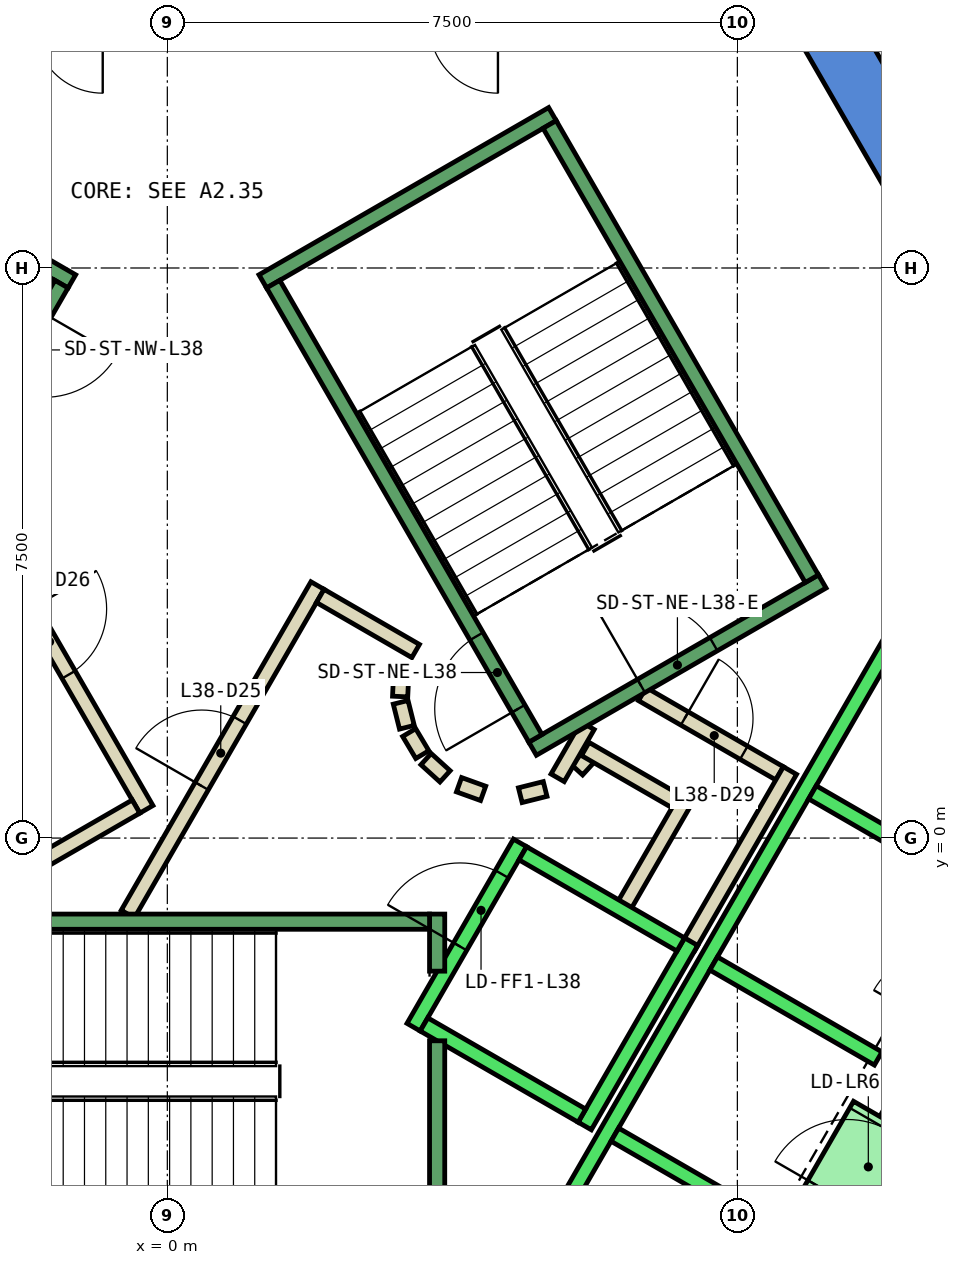
"""IFC4 building model, lengths in metres.
Left out: names, types, materials, properties, quantities, classifications, styles, units other than length and angle.
Written with IfcOpenShell. Run it as: python <this file> out.ifc"""

import sys

from ifc_helpers import new_model, si_unit, direction, frame, frame_2d, origin, place, context, subcontext, project, spatial, polyline, rectangle, outline, extrude, element, fill, save


model = new_model("IFC4")
c1 = context("Model", 3, precision=1e-05, world=origin(), true_north=direction((0.0, 1.0)))
c2 = subcontext(c1, "Body", "Model", "MODEL_VIEW")
j1 = project(units=[si_unit("LENGTHUNIT", "METRE"), si_unit("PLANEANGLEUNIT", "RADIAN")], contexts=[c1])
p1 = place(None, origin())
s1 = spatial("IfcSite", under=j1, at=p1, CompositionType="ELEMENT")
p2 = place(p1, origin())
s2 = spatial("IfcBuilding", under=s1, at=p2, CompositionType="ELEMENT")
p3 = place(p2, frame((0.0, 0.0, 171.8)))
s3 = spatial("IfcBuildingStorey", under=s2, at=p3, CompositionType="ELEMENT", Elevation=171.8)
p4 = place(p3, frame((0.0, 0.0, -0.4)))
e1 = element("IfcWall", 1, at=p4, inside=s3, PredefinedType="SHEAR", context=c2, shape_type="SweptSolid", body=[
    extrude(outline(polyline([(8.517, 11.748), (7.824, 11.348), (12.933, 2.5), (13.856, 2.5), (8.517, 11.748)])), origin(), (0.0, 0.0, 1.0), 4.2),
])
p5 = place(p3, frame((0.0, 0.0, -0.4)))
e2 = element("IfcWall", 2, at=p5, inside=s3, PredefinedType="SHEAR", context=c2, shape_type="SweptSolid", body=[
    extrude(outline(polyline([(10.717, -2.937), (10.025, -2.537), (9.374, -3.663), (10.067, -4.063), (10.717, -2.937)])), origin(), (0.0, 0.0, 1.0), 4.2),
])
p6 = place(p3, frame((0.0, 0.0, 3.6)))
e3 = element("IfcWall", 3, at=p6, inside=s3, PredefinedType="SHEAR", context=c2, shape_type="SweptSolid", body=[
    extrude(outline(polyline([(10.067, -4.063), (9.374, -3.663), (8.724, -4.789), (9.417, -5.189), (10.067, -4.063)])), origin(), (0.0, 0.0, 1.0), 0.2),
])
p7 = place(p3, frame((5.39, 0.898, 0.0), z_axis=(0.0, 0.0, 1.0), x_axis=(0.673828488714, 0.738887791073, 0.0)))
e4 = element("IfcWall", 4, at=p7, inside=s3, PredefinedType="PARTITIONING", context=c2, shape_type="SweptSolid", body=[
    extrude(rectangle(XDim=0.263, YDim=0.2, at=frame_2d((0.131, 0.0))), origin(), (0.0, 0.0, 1.0), 3.8),
])
p8 = place(p3, frame((5.499, 1.172, 0.0), z_axis=(0.0, 0.0, 1.0), x_axis=(0.866333505267, -0.499465972466, 0.0)))
e5 = element("IfcWall", 5, at=p8, inside=s3, PredefinedType="PARTITIONING", context=c2, shape_type="SweptSolid", body=[
    extrude(rectangle(XDim=1.374, YDim=0.2, at=frame_2d((0.687, 0.0))), origin(), (0.0, 0.0, 1.0), 3.8),
])
p9 = place(p3, frame((6.826, 0.522, 0.0), z_axis=(0.0, 0.0, 1.0), x_axis=(-0.500016722714, -0.866015748706, 0.0)))
e6 = element("IfcWall", 6, at=p9, inside=s3, PredefinedType="PARTITIONING", context=c2, shape_type="SweptSolid", body=[
    extrude(rectangle(XDim=1.7, YDim=0.2, at=frame_2d((0.85, 0.0))), origin(), (0.0, 0.0, 1.0), 3.8),
])
p10 = place(p3, frame((6.25, 1.894, 0.0), z_axis=(0.0, 0.0, 1.0), x_axis=(0.866043184279, -0.499969202016, 0.0)))
e7 = element("IfcWall", 7, at=p10, inside=s3, PredefinedType="PARTITIONING", context=c2, shape_type="SweptSolid", body=[
    extrude(rectangle(XDim=2.084, YDim=0.2, at=frame_2d((1.042, 0.0))), origin(), (0.0, 0.0, 1.0), 3.8),
])
p11 = place(p10, frame((0.642, 0.0, 0.0)))
e8 = element("IfcOpeningElement", 8, at=p11, cuts=e7, PredefinedType="OPENING", context=c2, shape_type="SweptSolid", body=[
    extrude(rectangle(XDim=0.9, YDim=2.1, at=frame_2d((0.45, 1.05))), frame((0.0, 0.11, 0.0), z_axis=(0.0, -1.0, 0.0), x_axis=(1.0, 0.0, 0.0)), (0.0, 0.0, 1.0), 0.22),
])
p12 = place(p3, frame((8.192, 0.888, 0.0), z_axis=(0.0, 0.0, 1.0), x_axis=(-0.499940625693, -0.866059680843, 0.0)))
e9 = element("IfcWall", 9, at=p12, inside=s3, PredefinedType="PARTITIONING", context=c2, shape_type="SweptSolid", body=[
    extrude(rectangle(XDim=2.68, YDim=0.2, at=frame_2d((1.34, 0.0))), origin(), (0.0, 0.0, 1.0), 3.8),
])
p13 = place(p3, frame((5.135, 0.793, 0.0), z_axis=(0.0, 0.0, 1.0), x_axis=(0.499526442893, 0.866298639529, 0.0)))
e10 = element("IfcWall", 10, at=p13, inside=s3, PredefinedType="PARTITIONING", context=c2, shape_type="SweptSolid", body=[
    extrude(rectangle(XDim=0.791, YDim=0.2, at=frame_2d((0.396, 0.0))), origin(), (0.0, 0.0, 1.0), 3.8),
])
p14 = place(p3, frame((-0.52, -1.0, 0.0), z_axis=(0.0, 0.0, 1.0), x_axis=(0.50011622646, 0.865958290007, 0.0)))
e11 = element("IfcWall", 11, at=p14, inside=s3, PredefinedType="PARTITIONING", context=c2, shape_type="SweptSolid", body=[
    extrude(rectangle(XDim=4.991, YDim=0.2, at=frame_2d((2.496, 0.0))), origin(), (0.0, 0.0, 1.0), 3.8),
])
p15 = place(p14, frame((1.945, 0.0, 0.0)))
e12 = element("IfcOpeningElement", 12, at=p15, cuts=e11, PredefinedType="OPENING", context=c2, shape_type="SweptSolid", body=[
    extrude(rectangle(XDim=1.0, YDim=2.1, at=frame_2d((0.5, 1.05))), frame((0.0, 0.11, 0.0), z_axis=(0.0, -1.0, 0.0), x_axis=(1.0, 0.0, 0.0)), (0.0, 0.0, 1.0), 0.22),
])
p16 = place(p3, frame((2.012, 3.186, 0.0), z_axis=(0.0, 0.0, 1.0), x_axis=(0.865891012941, -0.500232699559, 0.0)))
e13 = element("IfcWall", 13, at=p16, inside=s3, PredefinedType="PARTITIONING", context=c2, shape_type="SweptSolid", body=[
    extrude(rectangle(XDim=1.449, YDim=0.2, at=frame_2d((0.725, 0.0))), origin(), (0.0, 0.0, 1.0), 3.8),
])
p17 = place(p3, frame((3.079, 2.199, 0.0), z_axis=(0.0, 0.0, 1.0), x_axis=(-0.047771483479, -0.998858290933, 0.0)))
e14 = element("IfcWall", 14, at=p17, inside=s3, PredefinedType="PARTITIONING", context=c2, shape_type="SweptSolid", body=[
    extrude(rectangle(XDim=0.337, YDim=0.2, at=frame_2d((0.169, 0.0))), origin(), (0.0, 0.0, 1.0), 3.8),
])
p18 = place(p3, frame((3.07, 1.786, 0.0), z_axis=(0.0, 0.0, 1.0), x_axis=(0.242705583207, -0.970099994784, 0.0)))
e15 = element("IfcWall", 15, at=p18, inside=s3, PredefinedType="PARTITIONING", context=c2, shape_type="SweptSolid", body=[
    extrude(rectangle(XDim=0.338, YDim=0.2, at=frame_2d((0.169, 0.0))), origin(), (0.0, 0.0, 1.0), 3.8),
])
for number, where, z_axis, x_axis in (
    (16, (3.182, 1.388, 0.0), (0.0, 0.0, 1.0), (0.512, -0.859, 0.0)),
    (17, (3.404, 1.039, 0.0), (0.0, 0.0, 1.0), (0.74, -0.672, 0.0)),
):
    element("IfcWall", number, at=place(p3, frame(where, z_axis=z_axis, x_axis=x_axis)), inside=s3, PredefinedType="PARTITIONING", context=c2, shape_type="SweptSolid", body=[
        extrude(rectangle(XDim=0.338, YDim=0.2, at=frame_2d((0.169, 0.0))), origin(), (0.0, 0.0, 1.0), 3.8),
    ])
p19 = place(p3, frame((3.838, 0.702, 0.0), z_axis=(0.0, 0.0, 1.0), x_axis=(0.941035081519, -0.338308993895, 0.0)))
e18 = element("IfcWall", 18, at=p19, inside=s3, PredefinedType="PARTITIONING", context=c2, shape_type="SweptSolid", body=[
    extrude(rectangle(XDim=0.337, YDim=0.2, at=frame_2d((0.168, 0.0))), origin(), (0.0, 0.0, 1.0), 3.8),
])
p20 = place(p3, frame((4.644, 0.564, 0.0), z_axis=(0.0, 0.0, 1.0), x_axis=(0.969929076366, 0.243387729394, 0.0)))
e19 = element("IfcWall", 19, at=p20, inside=s3, PredefinedType="PARTITIONING", context=c2, shape_type="SweptSolid", body=[
    extrude(rectangle(XDim=0.337, YDim=0.2, at=frame_2d((0.168, 0.0))), origin(), (0.0, 0.0, 1.0), 3.8),
])
p21 = place(p3, frame((-2.771, 4.7, 0.0), z_axis=(0.0, 0.0, 1.0), x_axis=(0.499969479948, -0.866043023828, 0.0)))
e20 = element("IfcWall", 20, at=p21, inside=s3, PredefinedType="PARTITIONING", context=c2, shape_type="SweptSolid", body=[
    extrude(rectangle(XDim=4.99, YDim=0.2, at=frame_2d((2.495, 0.0))), origin(), (0.0, 0.0, 1.0), 3.8),
])
p22 = place(p21, frame((1.945, 0.0, 0.0)))
e21 = element("IfcOpeningElement", 21, at=p22, cuts=e20, PredefinedType="OPENING", context=c2, shape_type="SweptSolid", body=[
    extrude(rectangle(XDim=1.0, YDim=2.1, at=frame_2d((0.5, 1.05))), frame((0.0, 0.11, 0.0), z_axis=(0.0, -1.0, 0.0), x_axis=(1.0, 0.0, 0.0)), (0.0, 0.0, 1.0), 0.22),
])
p23 = place(p3, frame((-0.412, 0.414, 0.0), z_axis=(0.0, 0.0, 1.0), x_axis=(-0.866017369001, -0.500013916395, 0.0)))
e22 = element("IfcWall", 22, at=p23, inside=s3, PredefinedType="PARTITIONING", context=c2, shape_type="SweptSolid", body=[
    extrude(rectangle(XDim=1.45, YDim=0.2, at=frame_2d((0.725, 0.0))), origin(), (0.0, 0.0, 1.0), 3.8),
])
p24 = place(p3, frame((3.24, -2.488, 0.0), z_axis=(0.0, 0.0, 1.0), x_axis=(0.49994636267, 0.866056369097, 0.0)))
e23 = element("IfcWall", 23, at=p24, inside=s3, PredefinedType="STANDARD", context=c2, shape_type="SweptSolid", body=[
    extrude(rectangle(XDim=2.8, YDim=0.2, at=frame_2d((1.4, 0.0))), origin(), (0.0, 0.0, 1.0), 3.8),
])
p25 = place(p24, frame((1.225, 0.0, 0.0)))
e24 = element("IfcOpeningElement", 24, at=p25, cuts=e23, PredefinedType="OPENING", context=c2, shape_type="SweptSolid", body=[
    extrude(rectangle(XDim=1.1, YDim=2.1, at=frame_2d((0.55, 1.05))), frame((0.0, 0.11, 0.0), z_axis=(0.0, -1.0, 0.0), x_axis=(1.0, 0.0, 0.0)), (0.0, 0.0, 1.0), 0.22),
])
p26 = place(p3, frame((5.492, -3.788, 0.0), z_axis=(0.0, 0.0, 1.0), x_axis=(0.500011755427, 0.866018616679, 0.0)))
e25 = element("IfcWall", 25, at=p26, inside=s3, PredefinedType="STANDARD", context=c2, shape_type="SweptSolid", body=[
    extrude(rectangle(XDim=2.8, YDim=0.2, at=frame_2d((1.4, 0.0))), origin(), (0.0, 0.0, 1.0), 3.8),
])
p27 = place(p3, frame((3.377, -2.452, 0.0), z_axis=(0.0, 0.0, 1.0), x_axis=(0.865955154139, -0.50012165622, 0.0)))
e26 = element("IfcWall", 26, at=p27, inside=s3, PredefinedType="STANDARD", context=c2, shape_type="SweptSolid", body=[
    extrude(rectangle(XDim=2.4, YDim=0.2, at=frame_2d((1.2, 0.0))), origin(), (0.0, 0.0, 1.0), 3.8),
])
p28 = place(p3, frame((4.677, -0.2, 0.0), z_axis=(0.0, 0.0, 1.0), x_axis=(0.865973769406, -0.500089422704, 0.0)))
e27 = element("IfcWall", 27, at=p28, inside=s3, PredefinedType="STANDARD", context=c2, shape_type="SweptSolid", body=[
    extrude(rectangle(XDim=2.399, YDim=0.2, at=frame_2d((1.2, 0.0))), origin(), (0.0, 0.0, 1.0), 3.8),
])
p29 = place(p3, frame((4.451, -6.19, 0.0), z_axis=(0.0, 0.0, 1.0), x_axis=(0.50000090737, 0.866024879913, 0.0)))
e28 = element("IfcWall", 28, at=p29, inside=s3, PredefinedType="STANDARD", context=c2, shape_type="SweptSolid", body=[
    extrude(rectangle(XDim=10.6, YDim=0.2, at=frame_2d((5.3, 0.0))), origin(), (0.0, 0.0, 1.0), 3.8),
])
for number, where, z_axis, x_axis in (
    (29, (5.888, -3.902, 0.0), (0.0, 0.0, 1.0), (0.866, -0.5, 0.0)),
    (30, (7.188, -1.65, 0.0), (0.0, 0.0, 1.0), (0.866, -0.5, 0.0)),
    (31, (8.488, 0.602, 0.0), (0.0, 0.0, 1.0), (0.866, -0.5, 0.0)),
):
    element("IfcWall", number, at=place(p3, frame(where, z_axis=z_axis, x_axis=x_axis)), inside=s3, PredefinedType="STANDARD", context=c2, shape_type="SweptSolid", body=[
        extrude(rectangle(XDim=2.5, YDim=0.2, at=frame_2d((1.25, 0.0))), origin(), (0.0, 0.0, 1.0), 3.8),
    ])
p30 = place(p3, frame((8.898, -4.889, 0.0), z_axis=(0.0, 0.0, 1.0), x_axis=(0.500036693733, 0.866004217611, 0.0)))
e32 = element("IfcWall", 32, at=p30, inside=s3, PredefinedType="STANDARD", context=c2, shape_type="SweptSolid", body=[
    extrude(rectangle(XDim=1.3, YDim=1.2, at=frame_2d((0.65, 0.0))), origin(), (0.0, 0.0, 1.0), 2.4),
])
p31 = place(p30, frame((0.1, 0.0, 0.0)))
e33 = element("IfcOpeningElement", 33, at=p31, cuts=e32, PredefinedType="OPENING", context=c2, shape_type="SweptSolid", body=[
    extrude(rectangle(XDim=1.1, YDim=2.3, at=frame_2d((0.55, 1.15))), frame((0.0, 0.61, 0.0), z_axis=(0.0, -1.0, 0.0), x_axis=(1.0, 0.0, 0.0)), (0.0, 0.0, 1.0), 1.22),
])
p32 = place(p3, frame((3.55, -2.667, 0.0), z_axis=(0.0, 0.0, 1.0), x_axis=(0.0, -1.0, 0.0)))
e34 = element("IfcWall", 34, at=p32, inside=s3, PredefinedType="STANDARD", context=c2, shape_type="SweptSolid", body=[
    extrude(rectangle(XDim=2.733, YDim=0.2, at=frame_2d((1.366, 0.0))), origin(), (0.0, 0.0, 1.0), 3.8),
])
p33 = place(p3, frame((3.55, -1.0, 0.0), z_axis=(0.0, 0.0, 1.0), x_axis=(0.0, -1.0, 0.0)))
e35 = element("IfcWall", 35, at=p33, inside=s3, PredefinedType="STANDARD", context=c2, shape_type="SweptSolid", body=[
    extrude(rectangle(XDim=0.751, YDim=0.2, at=frame_2d((0.375, 0.0))), origin(), (0.0, 0.0, 1.0), 3.8),
])
p34 = place(p3, frame((-3.45, -1.1, 0.0), z_axis=(0.0, 0.0, 1.0), x_axis=(1.0, 0.0, 0.0)))
e36 = element("IfcWall", 36, at=p34, inside=s3, PredefinedType="STANDARD", context=c2, shape_type="SweptSolid", body=[
    extrude(rectangle(XDim=6.9, YDim=0.2, at=frame_2d((3.45, 0.0))), origin(), (0.0, 0.0, 1.0), 3.8),
])
p35 = place(p34, frame((0.45, 0.0, 0.0)))
e37 = element("IfcOpeningElement", 37, at=p35, cuts=e36, PredefinedType="OPENING", context=c2, shape_type="SweptSolid", body=[
    extrude(rectangle(XDim=1.1, YDim=2.2, at=frame_2d((0.55, 1.1))), frame((0.0, 0.11, 0.0), z_axis=(0.0, -1.0, 0.0), x_axis=(1.0, 0.0, 0.0)), (0.0, 0.0, 1.0), 0.22),
])
p36 = place(p3, frame((4.806, 1.176, 0.0), z_axis=(0.0, 0.0, 1.0), x_axis=(0.866059941101, 0.499940174841, 0.0)))
e38 = element("IfcWall", 38, at=p36, inside=s3, PredefinedType="STANDARD", context=c2, shape_type="SweptSolid", body=[
    extrude(rectangle(XDim=4.4, YDim=0.2, at=frame_2d((2.2, 0.0))), origin(), (0.0, 0.0, 1.0), 3.8),
])
p37 = place(p36, frame((1.65, 0.0, 0.0)))
e39 = element("IfcOpeningElement", 39, at=p37, cuts=e38, PredefinedType="OPENING", context=c2, shape_type="SweptSolid", body=[
    extrude(rectangle(XDim=1.1, YDim=2.2, at=frame_2d((0.55, 1.1))), frame((0.0, 0.11, 0.0), z_axis=(0.0, -1.0, 0.0), x_axis=(1.0, 0.0, 0.0)), (0.0, 0.0, 1.0), 0.22),
])
p38 = place(p3, frame((1.256, 7.324, 0.0), z_axis=(0.0, 0.0, 1.0), x_axis=(0.866046073146, 0.499964197906, 0.0)))
e40 = element("IfcWall", 40, at=p38, inside=s3, PredefinedType="STANDARD", context=c2, shape_type="SweptSolid", body=[
    extrude(rectangle(XDim=4.4, YDim=0.2, at=frame_2d((2.2, 0.0))), origin(), (0.0, 0.0, 1.0), 3.8),
])
p39 = place(p3, frame((4.843, 1.312, 0.0), z_axis=(0.0, 0.0, 1.0), x_axis=(-0.499963383562, 0.866046543262, 0.0)))
e41 = element("IfcWall", 41, at=p39, inside=s3, PredefinedType="STANDARD", context=c2, shape_type="SweptSolid", body=[
    extrude(rectangle(XDim=6.9, YDim=0.2, at=frame_2d((3.45, 0.0))), origin(), (0.0, 0.0, 1.0), 3.8),
])
p40 = place(p39, frame((0.45, 0.0, 0.0)))
e42 = element("IfcOpeningElement", 42, at=p40, cuts=e41, PredefinedType="OPENING", context=c2, shape_type="SweptSolid", body=[
    extrude(rectangle(XDim=1.1, YDim=2.2, at=frame_2d((0.55, 1.1))), frame((0.0, 0.11, 0.0), z_axis=(0.0, -1.0, 0.0), x_axis=(1.0, 0.0, 0.0)), (0.0, 0.0, 1.0), 0.22),
])
p41 = place(p3, frame((8.48, 3.412, 0.0), z_axis=(0.0, 0.0, 1.0), x_axis=(-0.499978703459, 0.866037698999, 0.0)))
e43 = element("IfcWall", 43, at=p41, inside=s3, PredefinedType="STANDARD", context=c2, shape_type="SweptSolid", body=[
    extrude(rectangle(XDim=6.9, YDim=0.2, at=frame_2d((3.45, 0.0))), origin(), (0.0, 0.0, 1.0), 3.8),
])
p42 = place(p3, frame((-1.256, 7.324, 0.0), z_axis=(0.0, 0.0, 1.0), x_axis=(-0.866046073146, 0.499964197906, 0.0)))
e44 = element("IfcWall", 44, at=p42, inside=s3, PredefinedType="STANDARD", context=c2, shape_type="SweptSolid", body=[
    extrude(rectangle(XDim=4.4, YDim=0.2, at=frame_2d((2.2, 0.0))), origin(), (0.0, 0.0, 1.0), 3.8),
])
p43 = place(p42, frame((1.65, 0.0, 0.0)))
e45 = element("IfcOpeningElement", 45, at=p43, cuts=e44, PredefinedType="OPENING", context=c2, shape_type="SweptSolid", body=[
    extrude(rectangle(XDim=1.1, YDim=2.2, at=frame_2d((0.55, 1.1))), frame((0.0, 0.11, 0.0), z_axis=(0.0, -1.0, 0.0), x_axis=(1.0, 0.0, 0.0)), (0.0, 0.0, 1.0), 0.22),
])
p44 = place(p3, frame((-1.393, 7.288, 0.0), z_axis=(0.0, 0.0, 1.0), x_axis=(-0.499963383562, -0.866046543262, 0.0)))
e46 = element("IfcWall", 46, at=p44, inside=s3, PredefinedType="STANDARD", context=c2, shape_type="SweptSolid", body=[
    extrude(rectangle(XDim=6.9, YDim=0.2, at=frame_2d((3.45, 0.0))), origin(), (0.0, 0.0, 1.0), 3.8),
])
p45 = place(p44, frame((0.45, 0.0, 0.0)))
e47 = element("IfcOpeningElement", 47, at=p45, cuts=e46, PredefinedType="OPENING", context=c2, shape_type="SweptSolid", body=[
    extrude(rectangle(XDim=1.1, YDim=2.2, at=frame_2d((0.55, 1.1))), frame((0.0, 0.11, 0.0), z_axis=(0.0, -1.0, 0.0), x_axis=(1.0, 0.0, 0.0)), (0.0, 0.0, 1.0), 0.22),
])
p46 = place(p15, origin())
e48 = element("IfcDoor", 48, at=p46, inside=s3, OperationType="SINGLE_SWING_LEFT", PredefinedType="DOOR", context=c2, shape_type="SweptSolid", body=[
    extrude(rectangle(XDim=1.0, YDim=2.1, at=frame_2d((0.5, 1.05))), frame((0.0, 0.025, 0.0), z_axis=(0.0, -1.0, 0.0), x_axis=(1.0, 0.0, 0.0)), (0.0, 0.0, 1.0), 0.05),
])
fill(e12, e48)
p47 = place(p22, origin())
e49 = element("IfcDoor", 49, at=p47, inside=s3, OperationType="SINGLE_SWING_RIGHT", PredefinedType="DOOR", context=c2, shape_type="SweptSolid", body=[
    extrude(rectangle(XDim=1.0, YDim=2.1, at=frame_2d((0.5, 1.05))), frame((0.0, 0.025, 0.0), z_axis=(0.0, -1.0, 0.0), x_axis=(1.0, 0.0, 0.0)), (0.0, 0.0, 1.0), 0.05),
])
fill(e21, e49)
p48 = place(p11, origin())
e50 = element("IfcDoor", 50, at=p48, inside=s3, OperationType="SINGLE_SWING_LEFT", PredefinedType="DOOR", context=c2, shape_type="SweptSolid", body=[
    extrude(rectangle(XDim=0.9, YDim=2.1, at=frame_2d((0.45, 1.05))), frame((0.0, 0.025, 0.0), z_axis=(0.0, -1.0, 0.0), x_axis=(1.0, 0.0, 0.0)), (0.0, 0.0, 1.0), 0.05),
])
fill(e8, e50)
p49 = place(p31, origin())
e51 = element("IfcDoor", 51, at=p49, inside=s3, OperationType="SLIDING_TO_LEFT", PredefinedType="DOOR", context=c2, shape_type="SweptSolid", body=[
    extrude(rectangle(XDim=1.1, YDim=2.3, at=frame_2d((0.55, 1.15))), frame((0.0, 0.025, 0.0), z_axis=(0.0, -1.0, 0.0), x_axis=(1.0, 0.0, 0.0)), (0.0, 0.0, 1.0), 0.05),
])
fill(e33, e51)
p50 = place(p25, origin())
e52 = element("IfcDoor", 52, at=p50, inside=s3, OperationType="SLIDING_TO_LEFT", PredefinedType="DOOR", context=c2, shape_type="SweptSolid", body=[
    extrude(rectangle(XDim=1.1, YDim=2.1, at=frame_2d((0.55, 1.05))), frame((0.0, 0.025, 0.0), z_axis=(0.0, -1.0, 0.0), x_axis=(1.0, 0.0, 0.0)), (0.0, 0.0, 1.0), 0.05),
])
fill(e24, e52)
p51 = place(p40, origin())
e53 = element("IfcDoor", 53, at=p51, inside=s3, OperationType="SINGLE_SWING_LEFT", PredefinedType="DOOR", context=c2, shape_type="SweptSolid", body=[
    extrude(rectangle(XDim=1.1, YDim=2.2, at=frame_2d((0.55, 1.1))), frame((0.0, 0.025, 0.0), z_axis=(0.0, -1.0, 0.0), x_axis=(1.0, 0.0, 0.0)), (0.0, 0.0, 1.0), 0.05),
])
fill(e42, e53)
p52 = place(p37, origin())
e54 = element("IfcDoor", 54, at=p52, inside=s3, OperationType="SINGLE_SWING_LEFT", PredefinedType="DOOR", context=c2, shape_type="SweptSolid", body=[
    extrude(rectangle(XDim=1.1, YDim=2.2, at=frame_2d((0.55, 1.1))), frame((0.0, 0.025, 0.0), z_axis=(0.0, -1.0, 0.0), x_axis=(1.0, 0.0, 0.0)), (0.0, 0.0, 1.0), 0.05),
])
fill(e39, e54)
save(model, sys.argv[1])
